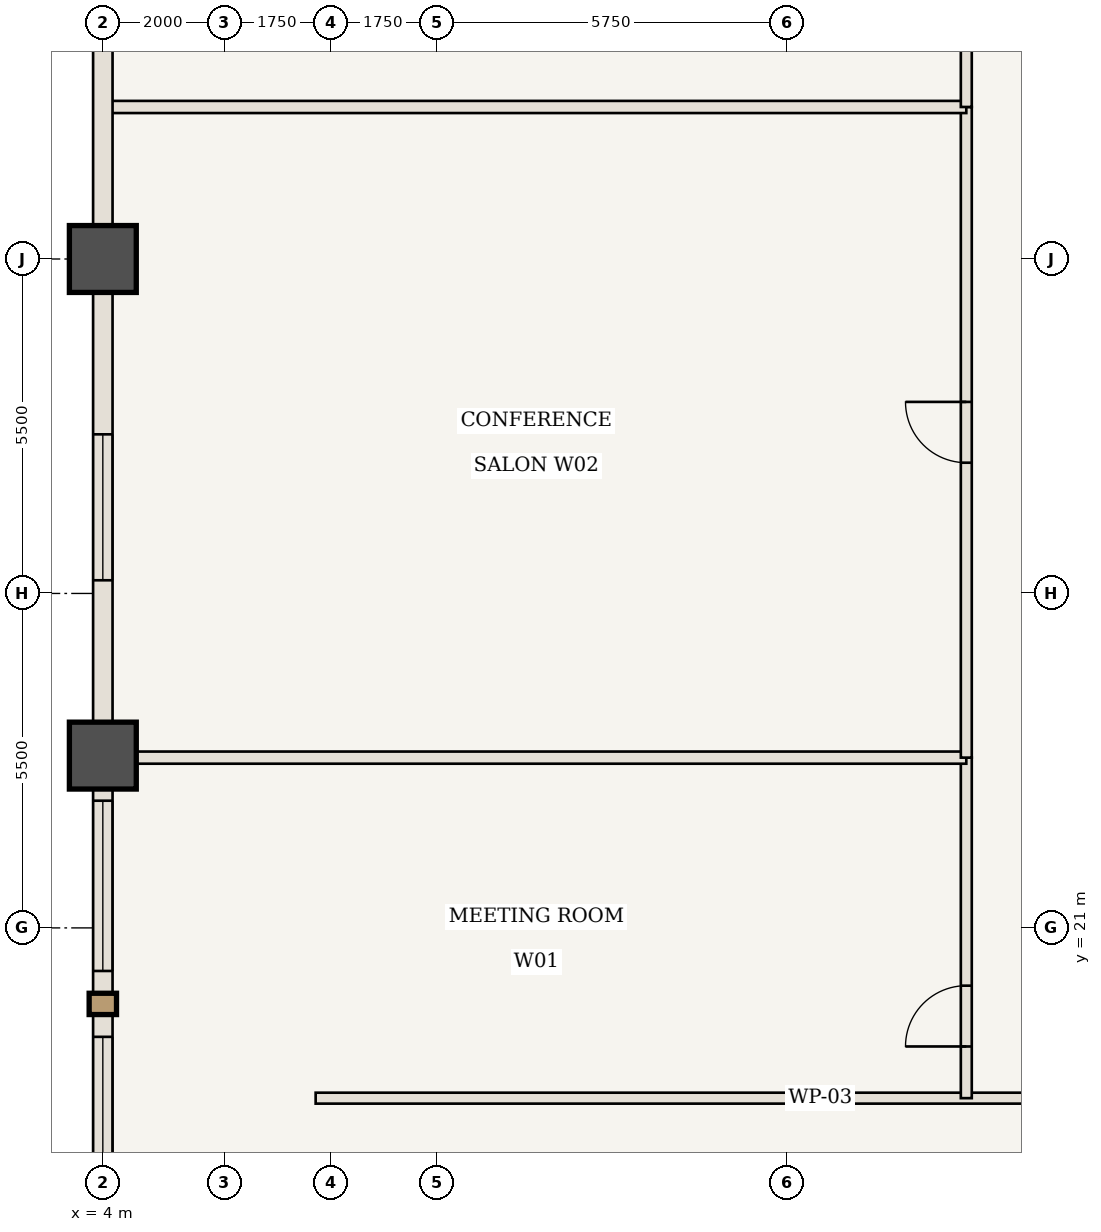
"""IFC4 building model, lengths in metres.
Left out: names, types, materials, properties, quantities, classifications, styles, units other than length and angle.
Written with IfcOpenShell. Run it as: python <this file> out.ifc"""

import sys

from ifc_helpers import new_model, si_unit, direction, frame, frame_2d, origin, origin_2d, place, context, subcontext, project, spatial, rectangle, extrude, element, fill, save


model = new_model("IFC4")
c1 = context("Model", 3, precision=1e-05, world=origin(), true_north=direction((0.0, 1.0)))
c2 = subcontext(c1, "Body", "Model", "MODEL_VIEW")
j1 = project(units=[si_unit("LENGTHUNIT", "METRE"), si_unit("PLANEANGLEUNIT", "RADIAN")], contexts=[c1])
p1 = place(None, origin())
s1 = spatial("IfcSite", under=j1, at=p1, CompositionType="ELEMENT")
p2 = place(p1, origin())
s2 = spatial("IfcBuilding", under=s1, at=p2, CompositionType="ELEMENT")
p3 = place(p2, frame((0.0, 0.0, 89.25)))
s3 = spatial("IfcBuildingStorey", under=s2, at=p3, CompositionType="ELEMENT", Elevation=89.25)
for number, where, z_axis, x_axis in (
    (1, (4.0, 23.833, 0.0), (0.0, 0.0, 1.0), (1.0, 0.0, 0.0)),
    (2, (4.0, 32.0, 0.0), (0.0, 0.0, 1.0), (1.0, 0.0, 0.0)),
):
    element("IfcColumn", number, at=place(p3, frame(where, z_axis=z_axis, x_axis=x_axis)), inside=s3, PredefinedType="COLUMN", context=c2, shape_type="SweptSolid", body=[
        extrude(rectangle(XDim=1.1, YDim=1.1, at=origin_2d()), origin(), (0.0, 0.0, 1.0), 3.5),
    ])
p4 = place(p3, frame((7.5, 18.2, 0.0), z_axis=(0.0, 0.0, 1.0), x_axis=(1.0, 0.0, 0.0)))
e3 = element("IfcWall", 3, at=p4, inside=s3, PredefinedType="STANDARD", context=c2, shape_type="SweptSolid", body=[
    extrude(rectangle(XDim=16.6, YDim=0.18, at=frame_2d((8.3, 0.0))), origin(), (0.0, 0.0, 1.0), 3.32),
])
p5 = place(p4, frame((11.725, 0.0, 0.0)))
e4 = element("IfcOpeningElement", 4, at=p5, cuts=e3, PredefinedType="OPENING", context=c2, shape_type="SweptSolid", body=[
    extrude(rectangle(XDim=1.0, YDim=2.15, at=frame_2d((0.5, 1.075))), frame((0.0, 0.1, 0.0), z_axis=(0.0, -1.0, 0.0), x_axis=(1.0, 0.0, 0.0)), (0.0, 0.0, 1.0), 0.2),
])
p6 = place(p3, frame((18.2, 18.2, 0.0), z_axis=(0.0, 0.0, 1.0), x_axis=(0.0, 1.0, 0.0)))
e5 = element("IfcWall", 5, at=p6, inside=s3, PredefinedType="STANDARD", context=c2, shape_type="SweptSolid", body=[
    extrude(rectangle(XDim=5.6, YDim=0.18, at=frame_2d((2.8, 0.0))), origin(), (0.0, 0.0, 1.0), 3.32),
])
p7 = place(p6, frame((0.85, 0.0, 0.0)))
e6 = element("IfcOpeningElement", 6, at=p7, cuts=e5, PredefinedType="OPENING", context=c2, shape_type="SweptSolid", body=[
    extrude(rectangle(XDim=1.0, YDim=2.15, at=frame_2d((0.5, 1.075))), frame((0.0, 0.1, 0.0), z_axis=(0.0, -1.0, 0.0), x_axis=(1.0, 0.0, 0.0)), (0.0, 0.0, 1.0), 0.2),
])
p8 = place(p3, frame((4.06, 23.8, 0.0), z_axis=(0.0, 0.0, 1.0), x_axis=(1.0, 0.0, 0.0)))
e7 = element("IfcWall", 7, at=p8, inside=s3, PredefinedType="STANDARD", context=c2, shape_type="SweptSolid", body=[
    extrude(rectangle(XDim=14.14, YDim=0.2, at=frame_2d((7.07, 0.0))), origin(), (0.0, 0.0, 1.0), 3.32),
])
p9 = place(p3, frame((18.2, 23.8, 0.0), z_axis=(0.0, 0.0, 1.0), x_axis=(0.0, 1.0, 0.0)))
e8 = element("IfcWall", 8, at=p9, inside=s3, PredefinedType="STANDARD", context=c2, shape_type="SweptSolid", body=[
    extrude(rectangle(XDim=10.7, YDim=0.18, at=frame_2d((5.35, 0.0))), origin(), (0.0, 0.0, 1.0), 3.32),
])
p10 = place(p9, frame((4.85, 0.0, 0.0)))
e9 = element("IfcOpeningElement", 9, at=p10, cuts=e8, PredefinedType="OPENING", context=c2, shape_type="SweptSolid", body=[
    extrude(rectangle(XDim=1.0, YDim=2.15, at=frame_2d((0.5, 1.075))), frame((0.0, 0.1, 0.0), z_axis=(0.0, -1.0, 0.0), x_axis=(1.0, 0.0, 0.0)), (0.0, 0.0, 1.0), 0.2),
])
p11 = place(p3, frame((4.06, 34.5, 0.0), z_axis=(0.0, 0.0, 1.0), x_axis=(1.0, 0.0, 0.0)))
e10 = element("IfcWall", 10, at=p11, inside=s3, PredefinedType="STANDARD", context=c2, shape_type="SweptSolid", body=[
    extrude(rectangle(XDim=14.14, YDim=0.2, at=frame_2d((7.07, 0.0))), origin(), (0.0, 0.0, 1.0), 3.32),
])
p12 = place(p3, frame((18.2, 34.5, 0.0), z_axis=(0.0, 0.0, 1.0), x_axis=(0.0, 1.0, 0.0)))
e11 = element("IfcWall", 11, at=p12, inside=s3, PredefinedType="STANDARD", context=c2, shape_type="SweptSolid", body=[
    extrude(rectangle(XDim=11.3, YDim=0.18, at=frame_2d((5.65, 0.0))), origin(), (0.0, 0.0, 1.0), 3.32),
])
p13 = place(p12, frame((5.15, 0.0, 0.0)))
e12 = element("IfcOpeningElement", 12, at=p13, cuts=e11, PredefinedType="OPENING", context=c2, shape_type="SweptSolid", body=[
    extrude(rectangle(XDim=1.0, YDim=2.15, at=frame_2d((0.5, 1.075))), frame((0.0, 0.1, 0.0), z_axis=(0.0, -1.0, 0.0), x_axis=(1.0, 0.0, 0.0)), (0.0, 0.0, 1.0), 0.2),
])
p14 = place(p3, frame((4.0, 15.667, 0.0), z_axis=(0.0, 0.0, 1.0), x_axis=(0.0, 1.0, 0.0)))
e13 = element("IfcWall", 13, at=p14, inside=s3, PredefinedType="USERDEFINED", context=c2, shape_type="SweptSolid", body=[
    extrude(rectangle(XDim=8.167, YDim=0.32, at=frame_2d((4.083, 0.0))), origin(), (0.0, 0.0, 1.0), 2.52),
])
p15 = place(p14, frame((0.742, 0.0, 0.85)))
e14 = element("IfcOpeningElement", 14, at=p15, cuts=e13, PredefinedType="OPENING", context=c2, shape_type="SweptSolid", body=[
    extrude(rectangle(XDim=2.8, YDim=1.47, at=frame_2d((1.4, 0.735))), frame((0.0, 0.17, 0.0), z_axis=(0.0, -1.0, 0.0), x_axis=(1.0, 0.0, 0.0)), (0.0, 0.0, 1.0), 0.34),
])
p16 = place(p14, frame((4.625, 0.0, 0.85)))
e15 = element("IfcOpeningElement", 15, at=p16, cuts=e13, PredefinedType="OPENING", context=c2, shape_type="SweptSolid", body=[
    extrude(rectangle(XDim=2.8, YDim=1.47, at=frame_2d((1.4, 0.735))), frame((0.0, 0.17, 0.0), z_axis=(0.0, -1.0, 0.0), x_axis=(1.0, 0.0, 0.0)), (0.0, 0.0, 1.0), 0.34),
])
p17 = place(p3, frame((4.0, 23.833, 0.0), z_axis=(0.0, 0.0, 1.0), x_axis=(0.0, 1.0, 0.0)))
e16 = element("IfcWall", 16, at=p17, inside=s3, PredefinedType="USERDEFINED", context=c2, shape_type="SweptSolid", body=[
    extrude(rectangle(XDim=8.167, YDim=0.32, at=frame_2d((4.083, 0.0))), origin(), (0.0, 0.0, 1.0), 2.52),
])
p18 = place(p17, frame((2.883, 0.0, 0.85)))
e17 = element("IfcOpeningElement", 17, at=p18, cuts=e16, PredefinedType="OPENING", context=c2, shape_type="SweptSolid", body=[
    extrude(rectangle(XDim=2.4, YDim=1.47, at=frame_2d((1.2, 0.735))), frame((0.0, 0.17, 0.0), z_axis=(0.0, -1.0, 0.0), x_axis=(1.0, 0.0, 0.0)), (0.0, 0.0, 1.0), 0.34),
])
p19 = place(p3, frame((4.0, 32.0, 0.0), z_axis=(0.0, 0.0, 1.0), x_axis=(0.0, 1.0, 0.0)))
e18 = element("IfcWall", 18, at=p19, inside=s3, PredefinedType="USERDEFINED", context=c2, shape_type="SweptSolid", body=[
    extrude(rectangle(XDim=8.167, YDim=0.32, at=frame_2d((4.083, 0.0))), origin(), (0.0, 0.0, 1.0), 2.52),
])
p20 = place(p19, frame((3.983, 0.0, 0.85)))
e19 = element("IfcOpeningElement", 19, at=p20, cuts=e18, PredefinedType="OPENING", context=c2, shape_type="SweptSolid", body=[
    extrude(rectangle(XDim=2.4, YDim=1.47, at=frame_2d((1.2, 0.735))), frame((0.0, 0.17, 0.0), z_axis=(0.0, -1.0, 0.0), x_axis=(1.0, 0.0, 0.0)), (0.0, 0.0, 1.0), 0.34),
])
p21 = place(p7, origin())
e20 = element("IfcDoor", 20, at=p21, inside=s3, OperationType="SINGLE_SWING_LEFT", PredefinedType="DOOR", context=c2, shape_type="SweptSolid", body=[
    extrude(rectangle(XDim=1.0, YDim=2.15, at=frame_2d((0.5, 1.075))), frame((0.0, 0.025, 0.0), z_axis=(0.0, -1.0, 0.0), x_axis=(1.0, 0.0, 0.0)), (0.0, 0.0, 1.0), 0.05),
])
fill(e6, e20)
p22 = place(p10, origin())
e21 = element("IfcDoor", 21, at=p22, inside=s3, OperationType="SINGLE_SWING_RIGHT", PredefinedType="DOOR", context=c2, shape_type="SweptSolid", body=[
    extrude(rectangle(XDim=1.0, YDim=2.15, at=frame_2d((0.5, 1.075))), frame((0.0, 0.025, 0.0), z_axis=(0.0, -1.0, 0.0), x_axis=(1.0, 0.0, 0.0)), (0.0, 0.0, 1.0), 0.05),
])
fill(e9, e21)
p23 = place(p15, origin())
e22 = element("IfcWindow", 22, at=p23, inside=s3, PartitioningType="SINGLE_PANEL", PredefinedType="WINDOW", context=c2, shape_type="SweptSolid", body=[
    extrude(rectangle(XDim=2.8, YDim=1.47, at=frame_2d((1.4, 0.735))), frame((0.0, 0.03, 0.0), z_axis=(0.0, -1.0, 0.0), x_axis=(1.0, 0.0, 0.0)), (0.0, 0.0, 1.0), 0.06),
])
fill(e14, e22)
p24 = place(p16, origin())
e23 = element("IfcWindow", 23, at=p24, inside=s3, PartitioningType="SINGLE_PANEL", PredefinedType="WINDOW", context=c2, shape_type="SweptSolid", body=[
    extrude(rectangle(XDim=2.8, YDim=1.47, at=frame_2d((1.4, 0.735))), frame((0.0, 0.03, 0.0), z_axis=(0.0, -1.0, 0.0), x_axis=(1.0, 0.0, 0.0)), (0.0, 0.0, 1.0), 0.06),
])
fill(e15, e23)
p25 = place(p18, origin())
e24 = element("IfcWindow", 24, at=p25, inside=s3, PartitioningType="SINGLE_PANEL", PredefinedType="WINDOW", context=c2, shape_type="SweptSolid", body=[
    extrude(rectangle(XDim=2.4, YDim=1.47, at=frame_2d((1.2, 0.735))), frame((0.0, 0.03, 0.0), z_axis=(0.0, -1.0, 0.0), x_axis=(1.0, 0.0, 0.0)), (0.0, 0.0, 1.0), 0.06),
])
fill(e17, e24)
save(model, sys.argv[1])
